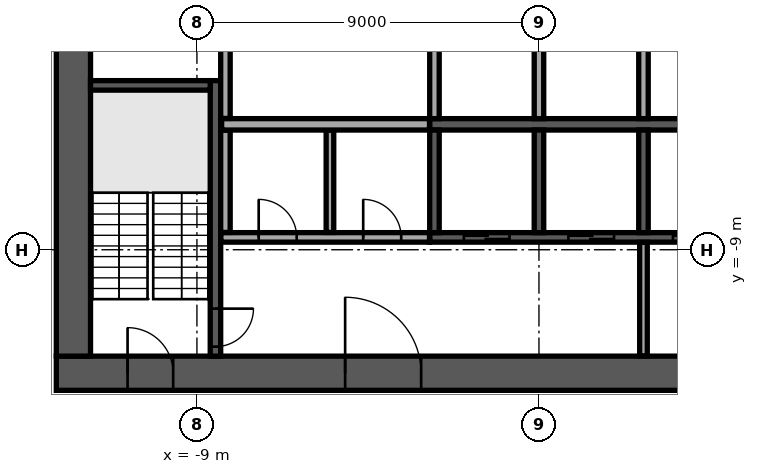
"""IFC4 building model, lengths in metres.
Left out: names, types, materials, properties, quantities, classifications, styles, units other than length and angle.
Written with IfcOpenShell. Run it as: python <this file> out.ifc"""

import sys

from ifc_helpers import new_model, si_unit, direction, frame, frame_2d, origin, place, context, subcontext, project, spatial, rectangle, extrude, element, fill, save


model = new_model("IFC4")
c1 = context("Model", 3, precision=1e-05, world=origin(), true_north=direction((0.0, 1.0)))
c2 = subcontext(c1, "Body", "Model", "MODEL_VIEW")
j1 = project(units=[si_unit("LENGTHUNIT", "METRE"), si_unit("PLANEANGLEUNIT", "RADIAN")], contexts=[c1])
p1 = place(None, origin())
s1 = spatial("IfcSite", under=j1, at=p1, CompositionType="ELEMENT")
p2 = place(p1, origin())
s2 = spatial("IfcBuilding", under=s1, at=p2, CompositionType="ELEMENT")
p3 = place(p2, frame((0.0, 0.0, 193.3)))
s3 = spatial("IfcBuildingStorey", under=s2, at=p3, CompositionType="ELEMENT", Elevation=193.3)
p4 = place(p3, frame((-12.7, -12.25, 0.0), z_axis=(0.0, 0.0, 1.0), x_axis=(1.0, 0.0, 0.0)))
e1 = element("IfcWall", 1, at=p4, inside=s3, PredefinedType="SHEAR", context=c2, shape_type="SweptSolid", body=[
    extrude(rectangle(XDim=25.4, YDim=0.9, at=frame_2d((12.7, 0.0))), origin(), (0.0, 0.0, 1.0), 3.62),
])
p5 = place(p4, frame((7.6, 0.0, 0.0)))
e2 = element("IfcOpeningElement", 2, at=p5, cuts=e1, PredefinedType="OPENING", context=c2, shape_type="SweptSolid", body=[
    extrude(rectangle(XDim=2.0, YDim=2.1, at=frame_2d((1.0, 1.05))), frame((0.0, 0.46, 0.0), z_axis=(0.0, -1.0, 0.0), x_axis=(1.0, 0.0, 0.0)), (0.0, 0.0, 1.0), 0.92),
])
p6 = place(p4, frame((17.725, 0.0, 0.0)))
e3 = element("IfcOpeningElement", 3, at=p6, cuts=e1, PredefinedType="OPENING", context=c2, shape_type="SweptSolid", body=[
    extrude(rectangle(XDim=1.2, YDim=2.1, at=frame_2d((0.6, 1.05))), frame((0.0, 0.46, 0.0), z_axis=(0.0, -1.0, 0.0), x_axis=(1.0, 0.0, 0.0)), (0.0, 0.0, 1.0), 0.92),
])
p7 = place(p4, frame((1.875, 0.0, 0.0)))
e4 = element("IfcOpeningElement", 4, at=p7, cuts=e1, PredefinedType="OPENING", context=c2, shape_type="SweptSolid", body=[
    extrude(rectangle(XDim=1.2, YDim=2.1, at=frame_2d((0.6, 1.05))), frame((0.0, 0.46, 0.0), z_axis=(0.0, -1.0, 0.0), x_axis=(1.0, 0.0, 0.0)), (0.0, 0.0, 1.0), 0.92),
])
p8 = place(p4, frame((22.325, 0.0, 0.0)))
e5 = element("IfcOpeningElement", 5, at=p8, cuts=e1, PredefinedType="OPENING", context=c2, shape_type="SweptSolid", body=[
    extrude(rectangle(XDim=1.2, YDim=2.1, at=frame_2d((0.6, 1.05))), frame((0.0, 0.46, 0.0), z_axis=(0.0, -1.0, 0.0), x_axis=(1.0, 0.0, 0.0)), (0.0, 0.0, 1.0), 0.92),
])
p9 = place(p3, frame((-12.25, -11.8, 0.0), z_axis=(0.0, 0.0, 1.0), x_axis=(0.0, 1.0, 0.0)))
e6 = element("IfcWall", 6, at=p9, inside=s3, PredefinedType="SHEAR", context=c2, shape_type="SweptSolid", body=[
    extrude(rectangle(XDim=23.6, YDim=0.9, at=frame_2d((11.8, 0.0))), origin(), (0.0, 0.0, 1.0), 3.62),
])
p10 = place(p9, frame((10.6, 0.0, 0.0)))
e7 = element("IfcOpeningElement", 7, at=p10, cuts=e6, PredefinedType="OPENING", context=c2, shape_type="SweptSolid", body=[
    extrude(rectangle(XDim=2.4, YDim=2.4, at=frame_2d((1.2, 1.2))), frame((0.0, 0.46, 0.0), z_axis=(0.0, -1.0, 0.0), x_axis=(1.0, 0.0, 0.0)), (0.0, 0.0, 1.0), 0.92),
])
p11 = place(p3, frame((-2.875, -5.7, 0.0), z_axis=(0.0, 0.0, 1.0), x_axis=(1.0, 0.0, 0.0)))
e8 = element("IfcWall", 8, at=p11, inside=s3, PredefinedType="SOLIDWALL", context=c2, shape_type="SweptSolid", body=[
    extrude(rectangle(XDim=11.25, YDim=0.3, at=frame_2d((5.625, 0.0))), origin(), (0.0, 0.0, 1.0), 3.62),
])
for number, where, z_axis, x_axis in (
    (9, (-2.75, -5.55, 0.0), (0.0, 0.0, 1.0), (0.0, 1.0, 0.0)),
    (10, (0.0, -5.55, 0.0), (0.0, 0.0, 1.0), (0.0, 1.0, 0.0)),
    (11, (2.75, -5.55, 0.0), (0.0, 0.0, 1.0), (0.0, 1.0, 0.0)),
):
    element("IfcWall", number, at=place(p3, frame(where, z_axis=z_axis, x_axis=x_axis)), inside=s3, PredefinedType="SOLIDWALL", context=c2, shape_type="SweptSolid", body=[
        extrude(rectangle(XDim=2.7, YDim=0.25, at=frame_2d((1.35, 0.0))), origin(), (0.0, 0.0, 1.0), 3.62),
    ])
p12 = place(p3, frame((-2.875, -8.675, 0.0), z_axis=(0.0, 0.0, 1.0), x_axis=(1.0, 0.0, 0.0)))
e12 = element("IfcWall", 12, at=p12, inside=s3, PredefinedType="SOLIDWALL", context=c2, shape_type="SweptSolid", body=[
    extrude(rectangle(XDim=11.25, YDim=0.25, at=frame_2d((5.625, 0.0))), origin(), (0.0, 0.0, 1.0), 3.62),
])
p13 = place(p12, frame((0.9, 0.0, 0.0)))
e13 = element("IfcOpeningElement", 13, at=p13, cuts=e12, PredefinedType="OPENING", context=c2, shape_type="SweptSolid", body=[
    extrude(rectangle(XDim=1.2, YDim=2.1, at=frame_2d((0.6, 1.05))), frame((0.0, 0.135, 0.0), z_axis=(0.0, -1.0, 0.0), x_axis=(1.0, 0.0, 0.0)), (0.0, 0.0, 1.0), 0.27),
])
p14 = place(p12, frame((3.65, 0.0, 0.0)))
e14 = element("IfcOpeningElement", 14, at=p14, cuts=e12, PredefinedType="OPENING", context=c2, shape_type="SweptSolid", body=[
    extrude(rectangle(XDim=1.2, YDim=2.1, at=frame_2d((0.6, 1.05))), frame((0.0, 0.135, 0.0), z_axis=(0.0, -1.0, 0.0), x_axis=(1.0, 0.0, 0.0)), (0.0, 0.0, 1.0), 0.27),
])
p15 = place(p12, frame((6.4, 0.0, 0.0)))
e15 = element("IfcOpeningElement", 15, at=p15, cuts=e12, PredefinedType="OPENING", context=c2, shape_type="SweptSolid", body=[
    extrude(rectangle(XDim=1.2, YDim=2.1, at=frame_2d((0.6, 1.05))), frame((0.0, 0.135, 0.0), z_axis=(0.0, -1.0, 0.0), x_axis=(1.0, 0.0, 0.0)), (0.0, 0.0, 1.0), 0.27),
])
p16 = place(p12, frame((9.15, 0.0, 0.0)))
e16 = element("IfcOpeningElement", 16, at=p16, cuts=e12, PredefinedType="OPENING", context=c2, shape_type="SweptSolid", body=[
    extrude(rectangle(XDim=1.2, YDim=2.1, at=frame_2d((0.6, 1.05))), frame((0.0, 0.135, 0.0), z_axis=(0.0, -1.0, 0.0), x_axis=(1.0, 0.0, 0.0)), (0.0, 0.0, 1.0), 0.27),
])
for number, where, z_axis, x_axis in (
    (17, (-2.75, -8.55, 0.0), (0.0, 0.0, 1.0), (0.0, 1.0, 0.0)),
    (18, (0.0, -8.55, 0.0), (0.0, 0.0, 1.0), (0.0, 1.0, 0.0)),
    (19, (2.75, -8.55, 0.0), (0.0, 0.0, 1.0), (0.0, 1.0, 0.0)),
):
    element("IfcWall", number, at=place(p3, frame(where, z_axis=z_axis, x_axis=x_axis)), inside=s3, PredefinedType="SOLIDWALL", context=c2, shape_type="SweptSolid", body=[
        extrude(rectangle(XDim=2.7, YDim=0.25, at=frame_2d((1.35, 0.0))), origin(), (0.0, 0.0, 1.0), 3.62),
    ])
p17 = place(p3, frame((-8.512, -4.55, 0.0), z_axis=(0.0, 0.0, 1.0), x_axis=(0.0, -1.0, 0.0)))
e20 = element("IfcWall", 20, at=p17, inside=s3, PredefinedType="SOLIDWALL", context=c2, shape_type="SweptSolid", body=[
    extrude(rectangle(XDim=7.25, YDim=0.275, at=frame_2d((3.625, 0.0))), origin(), (0.0, 0.0, 1.0), 3.62),
])
p18 = place(p17, frame((6.0, 0.0, 0.0)))
e21 = element("IfcOpeningElement", 21, at=p18, cuts=e20, PredefinedType="OPENING", context=c2, shape_type="SweptSolid", body=[
    extrude(rectangle(XDim=1.0, YDim=2.1, at=frame_2d((0.5, 1.05))), frame((0.0, 0.147, 0.0), z_axis=(0.0, -1.0, 0.0), x_axis=(1.0, 0.0, 0.0)), (0.0, 0.0, 1.0), 0.295),
])
p19 = place(p3, frame((-8.65, -4.675, 0.0), z_axis=(0.0, 0.0, 1.0), x_axis=(-1.0, 0.0, 0.0)))
e22 = element("IfcWall", 22, at=p19, inside=s3, PredefinedType="SOLIDWALL", context=c2, shape_type="SweptSolid", body=[
    extrude(rectangle(XDim=3.15, YDim=0.25, at=frame_2d((1.575, 0.0))), origin(), (0.0, 0.0, 1.0), 3.62),
])
p20 = place(p3, frame((2.75, -11.795, 0.0), z_axis=(0.0, 0.0, 1.0), x_axis=(0.0, 1.0, 0.0)))
e23 = element("IfcWall", 23, at=p20, inside=s3, PredefinedType="PARTITIONING", context=c2, shape_type="SweptSolid", body=[
    extrude(rectangle(XDim=2.99, YDim=0.2, at=frame_2d((1.495, 0.0))), origin(), (0.0, 0.0, 1.0), 3.62),
])
p21 = place(p3, frame((-8.37, -8.675, 0.0), z_axis=(0.0, 0.0, 1.0), x_axis=(1.0, 0.0, 0.0)))
e24 = element("IfcWall", 24, at=p21, inside=s3, PredefinedType="PARTITIONING", context=c2, shape_type="SweptSolid", body=[
    extrude(rectangle(XDim=5.49, YDim=0.25, at=frame_2d((2.745, 0.0))), origin(), (0.0, 0.0, 1.0), 3.62),
])
p22 = place(p21, frame((0.995, 0.0, 0.0)))
e25 = element("IfcOpeningElement", 25, at=p22, cuts=e24, PredefinedType="OPENING", context=c2, shape_type="SweptSolid", body=[
    extrude(rectangle(XDim=1.0, YDim=2.1, at=frame_2d((0.5, 1.05))), frame((0.0, 0.135, 0.0), z_axis=(0.0, -1.0, 0.0), x_axis=(1.0, 0.0, 0.0)), (0.0, 0.0, 1.0), 0.27),
])
p23 = place(p21, frame((3.745, 0.0, 0.0)))
e26 = element("IfcOpeningElement", 26, at=p23, cuts=e24, PredefinedType="OPENING", context=c2, shape_type="SweptSolid", body=[
    extrude(rectangle(XDim=1.0, YDim=2.1, at=frame_2d((0.5, 1.05))), frame((0.0, 0.135, 0.0), z_axis=(0.0, -1.0, 0.0), x_axis=(1.0, 0.0, 0.0)), (0.0, 0.0, 1.0), 0.27),
])
p24 = place(p3, frame((-8.25, -8.545, 0.0), z_axis=(0.0, 0.0, 1.0), x_axis=(0.0, 1.0, 0.0)))
e27 = element("IfcWall", 27, at=p24, inside=s3, PredefinedType="PARTITIONING", context=c2, shape_type="SweptSolid", body=[
    extrude(rectangle(XDim=2.69, YDim=0.25, at=frame_2d((1.345, 0.0))), origin(), (0.0, 0.0, 1.0), 3.62),
])
p25 = place(p3, frame((-5.5, -8.545, 0.0), z_axis=(0.0, 0.0, 1.0), x_axis=(0.0, 1.0, 0.0)))
e28 = element("IfcWall", 28, at=p25, inside=s3, PredefinedType="PARTITIONING", context=c2, shape_type="SweptSolid", body=[
    extrude(rectangle(XDim=2.69, YDim=0.2, at=frame_2d((1.345, 0.0))), origin(), (0.0, 0.0, 1.0), 3.62),
])
p26 = place(p3, frame((-8.35, -5.7, 0.0), z_axis=(0.0, 0.0, 1.0), x_axis=(1.0, 0.0, 0.0)))
e29 = element("IfcWall", 29, at=p26, inside=s3, PredefinedType="PARTITIONING", context=c2, shape_type="SweptSolid", body=[
    extrude(rectangle(XDim=5.47, YDim=0.3, at=frame_2d((2.735, 0.0))), origin(), (0.0, 0.0, 1.0), 3.62),
])
p27 = place(p3, frame((-8.25, -5.545, 0.0), z_axis=(0.0, 0.0, 1.0), x_axis=(0.0, 1.0, 0.0)))
e30 = element("IfcWall", 30, at=p27, inside=s3, PredefinedType="PARTITIONING", context=c2, shape_type="SweptSolid", body=[
    extrude(rectangle(XDim=2.69, YDim=0.25, at=frame_2d((1.345, 0.0))), origin(), (0.0, 0.0, 1.0), 3.62),
])
p28 = place(p3, frame((-35.208, -4.768, 0.0), z_axis=(0.0, 0.0, 1.0), x_axis=(0.656058749455, -0.754709823219, 0.0)))
e31 = element("IfcWall", 31, at=p28, inside=s3, PredefinedType="STANDARD", context=c2, shape_type="SweptSolid", body=[
    extrude(rectangle(XDim=39.0, YDim=0.6, at=frame_2d((19.5, 0.0))), origin(), (0.0, 0.0, 1.0), 3.62),
])
p29 = place(p28, frame((1.217, 0.0, 0.9)))
e32 = element("IfcOpeningElement", 32, at=p29, cuts=e31, PredefinedType="OPENING", context=c2, shape_type="SweptSolid", body=[
    extrude(rectangle(XDim=1.9, YDim=2.1, at=frame_2d((0.95, 1.05))), frame((0.0, 0.31, 0.0), z_axis=(0.0, -1.0, 0.0), x_axis=(1.0, 0.0, 0.0)), (0.0, 0.0, 1.0), 0.62),
])
p30 = place(p28, frame((5.55, 0.0, 0.9)))
e33 = element("IfcOpeningElement", 33, at=p30, cuts=e31, PredefinedType="OPENING", context=c2, shape_type="SweptSolid", body=[
    extrude(rectangle(XDim=1.9, YDim=2.1, at=frame_2d((0.95, 1.05))), frame((0.0, 0.31, 0.0), z_axis=(0.0, -1.0, 0.0), x_axis=(1.0, 0.0, 0.0)), (0.0, 0.0, 1.0), 0.62),
])
p31 = place(p28, frame((9.883, 0.0, 0.9)))
e34 = element("IfcOpeningElement", 34, at=p31, cuts=e31, PredefinedType="OPENING", context=c2, shape_type="SweptSolid", body=[
    extrude(rectangle(XDim=1.9, YDim=2.1, at=frame_2d((0.95, 1.05))), frame((0.0, 0.31, 0.0), z_axis=(0.0, -1.0, 0.0), x_axis=(1.0, 0.0, 0.0)), (0.0, 0.0, 1.0), 0.62),
])
p32 = place(p28, frame((14.217, 0.0, 0.9)))
e35 = element("IfcOpeningElement", 35, at=p32, cuts=e31, PredefinedType="OPENING", context=c2, shape_type="SweptSolid", body=[
    extrude(rectangle(XDim=1.9, YDim=2.1, at=frame_2d((0.95, 1.05))), frame((0.0, 0.31, 0.0), z_axis=(0.0, -1.0, 0.0), x_axis=(1.0, 0.0, 0.0)), (0.0, 0.0, 1.0), 0.62),
])
p33 = place(p28, frame((18.55, 0.0, 0.9)))
e36 = element("IfcOpeningElement", 36, at=p33, cuts=e31, PredefinedType="OPENING", context=c2, shape_type="SweptSolid", body=[
    extrude(rectangle(XDim=1.9, YDim=2.1, at=frame_2d((0.95, 1.05))), frame((0.0, 0.31, 0.0), z_axis=(0.0, -1.0, 0.0), x_axis=(1.0, 0.0, 0.0)), (0.0, 0.0, 1.0), 0.62),
])
p34 = place(p28, frame((22.883, 0.0, 0.9)))
e37 = element("IfcOpeningElement", 37, at=p34, cuts=e31, PredefinedType="OPENING", context=c2, shape_type="SweptSolid", body=[
    extrude(rectangle(XDim=1.9, YDim=2.1, at=frame_2d((0.95, 1.05))), frame((0.0, 0.31, 0.0), z_axis=(0.0, -1.0, 0.0), x_axis=(1.0, 0.0, 0.0)), (0.0, 0.0, 1.0), 0.62),
])
p35 = place(p28, frame((27.217, 0.0, 0.9)))
e38 = element("IfcOpeningElement", 38, at=p35, cuts=e31, PredefinedType="OPENING", context=c2, shape_type="SweptSolid", body=[
    extrude(rectangle(XDim=1.9, YDim=2.1, at=frame_2d((0.95, 1.05))), frame((0.0, 0.31, 0.0), z_axis=(0.0, -1.0, 0.0), x_axis=(1.0, 0.0, 0.0)), (0.0, 0.0, 1.0), 0.62),
])
p36 = place(p28, frame((31.55, 0.0, 0.9)))
e39 = element("IfcOpeningElement", 39, at=p36, cuts=e31, PredefinedType="OPENING", context=c2, shape_type="SweptSolid", body=[
    extrude(rectangle(XDim=1.9, YDim=2.1, at=frame_2d((0.95, 1.05))), frame((0.0, 0.31, 0.0), z_axis=(0.0, -1.0, 0.0), x_axis=(1.0, 0.0, 0.0)), (0.0, 0.0, 1.0), 0.62),
])
p37 = place(p28, frame((35.883, 0.0, 0.9)))
e40 = element("IfcOpeningElement", 40, at=p37, cuts=e31, PredefinedType="OPENING", context=c2, shape_type="SweptSolid", body=[
    extrude(rectangle(XDim=1.9, YDim=2.1, at=frame_2d((0.95, 1.05))), frame((0.0, 0.31, 0.0), z_axis=(0.0, -1.0, 0.0), x_axis=(1.0, 0.0, 0.0)), (0.0, 0.0, 1.0), 0.62),
])
p38 = place(p3, frame((-2.286, -34.715, 0.0), z_axis=(0.0, 0.0, 1.0), x_axis=(0.754708272811, 0.656060532993, 0.0)))
e41 = element("IfcWall", 41, at=p38, inside=s3, PredefinedType="STANDARD", context=c2, shape_type="SweptSolid", body=[
    extrude(rectangle(XDim=49.0, YDim=0.6, at=frame_2d((24.5, 0.0))), origin(), (0.0, 0.0, 1.0), 3.62),
])
p39 = place(p38, frame((1.227, 0.0, 0.9)))
e42 = element("IfcOpeningElement", 42, at=p39, cuts=e41, PredefinedType="OPENING", context=c2, shape_type="SweptSolid", body=[
    extrude(rectangle(XDim=2.0, YDim=2.1, at=frame_2d((1.0, 1.05))), frame((0.0, 0.31, 0.0), z_axis=(0.0, -1.0, 0.0), x_axis=(1.0, 0.0, 0.0)), (0.0, 0.0, 1.0), 0.62),
])
p40 = place(p38, frame((5.682, 0.0, 0.9)))
e43 = element("IfcOpeningElement", 43, at=p40, cuts=e41, PredefinedType="OPENING", context=c2, shape_type="SweptSolid", body=[
    extrude(rectangle(XDim=2.0, YDim=2.1, at=frame_2d((1.0, 1.05))), frame((0.0, 0.31, 0.0), z_axis=(0.0, -1.0, 0.0), x_axis=(1.0, 0.0, 0.0)), (0.0, 0.0, 1.0), 0.62),
])
p41 = place(p38, frame((10.136, 0.0, 0.9)))
e44 = element("IfcOpeningElement", 44, at=p41, cuts=e41, PredefinedType="OPENING", context=c2, shape_type="SweptSolid", body=[
    extrude(rectangle(XDim=2.0, YDim=2.1, at=frame_2d((1.0, 1.05))), frame((0.0, 0.31, 0.0), z_axis=(0.0, -1.0, 0.0), x_axis=(1.0, 0.0, 0.0)), (0.0, 0.0, 1.0), 0.62),
])
p42 = place(p38, frame((14.591, 0.0, 0.9)))
e45 = element("IfcOpeningElement", 45, at=p42, cuts=e41, PredefinedType="OPENING", context=c2, shape_type="SweptSolid", body=[
    extrude(rectangle(XDim=2.0, YDim=2.1, at=frame_2d((1.0, 1.05))), frame((0.0, 0.31, 0.0), z_axis=(0.0, -1.0, 0.0), x_axis=(1.0, 0.0, 0.0)), (0.0, 0.0, 1.0), 0.62),
])
p43 = place(p38, frame((19.045, 0.0, 0.9)))
e46 = element("IfcOpeningElement", 46, at=p43, cuts=e41, PredefinedType="OPENING", context=c2, shape_type="SweptSolid", body=[
    extrude(rectangle(XDim=2.0, YDim=2.1, at=frame_2d((1.0, 1.05))), frame((0.0, 0.31, 0.0), z_axis=(0.0, -1.0, 0.0), x_axis=(1.0, 0.0, 0.0)), (0.0, 0.0, 1.0), 0.62),
])
p44 = place(p38, frame((23.5, 0.0, 0.9)))
e47 = element("IfcOpeningElement", 47, at=p44, cuts=e41, PredefinedType="OPENING", context=c2, shape_type="SweptSolid", body=[
    extrude(rectangle(XDim=2.0, YDim=2.1, at=frame_2d((1.0, 1.05))), frame((0.0, 0.31, 0.0), z_axis=(0.0, -1.0, 0.0), x_axis=(1.0, 0.0, 0.0)), (0.0, 0.0, 1.0), 0.62),
])
p45 = place(p38, frame((27.955, 0.0, 0.9)))
e48 = element("IfcOpeningElement", 48, at=p45, cuts=e41, PredefinedType="OPENING", context=c2, shape_type="SweptSolid", body=[
    extrude(rectangle(XDim=2.0, YDim=2.1, at=frame_2d((1.0, 1.05))), frame((0.0, 0.31, 0.0), z_axis=(0.0, -1.0, 0.0), x_axis=(1.0, 0.0, 0.0)), (0.0, 0.0, 1.0), 0.62),
])
p46 = place(p38, frame((32.409, 0.0, 0.9)))
e49 = element("IfcOpeningElement", 49, at=p46, cuts=e41, PredefinedType="OPENING", context=c2, shape_type="SweptSolid", body=[
    extrude(rectangle(XDim=2.0, YDim=2.1, at=frame_2d((1.0, 1.05))), frame((0.0, 0.31, 0.0), z_axis=(0.0, -1.0, 0.0), x_axis=(1.0, 0.0, 0.0)), (0.0, 0.0, 1.0), 0.62),
])
p47 = place(p38, frame((36.864, 0.0, 0.9)))
e50 = element("IfcOpeningElement", 50, at=p47, cuts=e41, PredefinedType="OPENING", context=c2, shape_type="SweptSolid", body=[
    extrude(rectangle(XDim=2.0, YDim=2.1, at=frame_2d((1.0, 1.05))), frame((0.0, 0.31, 0.0), z_axis=(0.0, -1.0, 0.0), x_axis=(1.0, 0.0, 0.0)), (0.0, 0.0, 1.0), 0.62),
])
p48 = place(p38, frame((41.318, 0.0, 0.9)))
e51 = element("IfcOpeningElement", 51, at=p48, cuts=e41, PredefinedType="OPENING", context=c2, shape_type="SweptSolid", body=[
    extrude(rectangle(XDim=2.0, YDim=2.1, at=frame_2d((1.0, 1.05))), frame((0.0, 0.31, 0.0), z_axis=(0.0, -1.0, 0.0), x_axis=(1.0, 0.0, 0.0)), (0.0, 0.0, 1.0), 0.62),
])
p49 = place(p38, frame((45.773, 0.0, 0.9)))
e52 = element("IfcOpeningElement", 52, at=p49, cuts=e41, PredefinedType="OPENING", context=c2, shape_type="SweptSolid", body=[
    extrude(rectangle(XDim=2.0, YDim=2.1, at=frame_2d((1.0, 1.05))), frame((0.0, 0.31, 0.0), z_axis=(0.0, -1.0, 0.0), x_axis=(1.0, 0.0, 0.0)), (0.0, 0.0, 1.0), 0.62),
])
p50 = place(p3, frame((-24.98, -4.673, 0.0), z_axis=(0.0, 0.0, 1.0), x_axis=(0.656048444225, -0.754718781289, 0.0)))
e53 = element("IfcWall", 53, at=p50, inside=s3, PredefinedType="PARTITIONING", context=c2, shape_type="SweptSolid", body=[
    extrude(rectangle(XDim=25.8, YDim=0.15, at=frame_2d((12.9, 0.0))), origin(), (0.0, 0.0, 1.0), 3.17),
])
p51 = place(p50, frame((12.071, 0.0, 0.0)))
e54 = element("IfcOpeningElement", 54, at=p51, cuts=e53, PredefinedType="OPENING", context=c2, shape_type="SweptSolid", body=[
    extrude(rectangle(XDim=1.0, YDim=2.1, at=frame_2d((0.5, 1.05))), frame((0.0, 0.085, 0.0), z_axis=(0.0, -1.0, 0.0), x_axis=(1.0, 0.0, 0.0)), (0.0, 0.0, 1.0), 0.17),
])
p52 = place(p50, frame((24.318, 0.0, 0.0)))
e55 = element("IfcOpeningElement", 55, at=p52, cuts=e53, PredefinedType="OPENING", context=c2, shape_type="SweptSolid", body=[
    extrude(rectangle(XDim=1.0, YDim=2.1, at=frame_2d((0.5, 1.05))), frame((0.0, 0.085, 0.0), z_axis=(0.0, -1.0, 0.0), x_axis=(1.0, 0.0, 0.0)), (0.0, 0.0, 1.0), 0.17),
])
p53 = place(p3, frame((-1.0, -26.268, 0.0), z_axis=(0.0, 0.0, 1.0), x_axis=(0.754711356604, 0.656056985492, 0.0)))
e56 = element("IfcWall", 56, at=p53, inside=s3, PredefinedType="PARTITIONING", context=c2, shape_type="SweptSolid", body=[
    extrude(rectangle(XDim=36.052, YDim=0.15, at=frame_2d((18.026, 0.0))), origin(), (0.0, 0.0, 1.0), 3.17),
])
p54 = place(p53, frame((9.598, 0.0, 0.0)))
e57 = element("IfcOpeningElement", 57, at=p54, cuts=e56, PredefinedType="OPENING", context=c2, shape_type="SweptSolid", body=[
    extrude(rectangle(XDim=1.0, YDim=2.1, at=frame_2d((0.5, 1.05))), frame((0.0, 0.085, 0.0), z_axis=(0.0, -1.0, 0.0), x_axis=(1.0, 0.0, 0.0)), (0.0, 0.0, 1.0), 0.17),
])
p55 = place(p53, frame((20.957, 0.0, 0.0)))
e58 = element("IfcOpeningElement", 58, at=p55, cuts=e56, PredefinedType="OPENING", context=c2, shape_type="SweptSolid", body=[
    extrude(rectangle(XDim=1.0, YDim=2.1, at=frame_2d((0.5, 1.05))), frame((0.0, 0.085, 0.0), z_axis=(0.0, -1.0, 0.0), x_axis=(1.0, 0.0, 0.0)), (0.0, 0.0, 1.0), 0.17),
])
p56 = place(p53, frame((27.87, 0.0, 0.0)))
e59 = element("IfcOpeningElement", 59, at=p56, cuts=e56, PredefinedType="OPENING", context=c2, shape_type="SweptSolid", body=[
    extrude(rectangle(XDim=1.8, YDim=2.1, at=frame_2d((0.9, 1.05))), frame((0.0, 0.085, 0.0), z_axis=(0.0, -1.0, 0.0), x_axis=(1.0, 0.0, 0.0)), (0.0, 0.0, 1.0), 0.17),
])
p57 = place(p5, origin())
e60 = element("IfcDoor", 60, at=p57, inside=s3, OperationType="SINGLE_SWING_LEFT", PredefinedType="DOOR", context=c2, shape_type="SweptSolid", body=[
    extrude(rectangle(XDim=2.0, YDim=2.1, at=frame_2d((1.0, 1.05))), frame((0.0, 0.025, 0.0), z_axis=(0.0, -1.0, 0.0), x_axis=(1.0, 0.0, 0.0)), (0.0, 0.0, 1.0), 0.05),
])
fill(e2, e60)
p58 = place(p7, origin())
e61 = element("IfcDoor", 61, at=p58, inside=s3, OperationType="SINGLE_SWING_LEFT", PredefinedType="DOOR", context=c2, shape_type="SweptSolid", body=[
    extrude(rectangle(XDim=1.2, YDim=2.1, at=frame_2d((0.6, 1.05))), frame((0.0, 0.025, 0.0), z_axis=(0.0, -1.0, 0.0), x_axis=(1.0, 0.0, 0.0)), (0.0, 0.0, 1.0), 0.05),
])
fill(e4, e61)
p59 = place(p13, origin())
e62 = element("IfcDoor", 62, at=p59, inside=s3, OperationType="DOUBLE_DOOR_SLIDING", PredefinedType="DOOR", context=c2, shape_type="SweptSolid", body=[
    extrude(rectangle(XDim=1.2, YDim=2.1, at=frame_2d((0.6, 1.05))), frame((0.0, 0.025, 0.0), z_axis=(0.0, -1.0, 0.0), x_axis=(1.0, 0.0, 0.0)), (0.0, 0.0, 1.0), 0.05),
])
fill(e13, e62)
p60 = place(p14, origin())
e63 = element("IfcDoor", 63, at=p60, inside=s3, OperationType="DOUBLE_DOOR_SLIDING", PredefinedType="DOOR", context=c2, shape_type="SweptSolid", body=[
    extrude(rectangle(XDim=1.2, YDim=2.1, at=frame_2d((0.6, 1.05))), frame((0.0, 0.025, 0.0), z_axis=(0.0, -1.0, 0.0), x_axis=(1.0, 0.0, 0.0)), (0.0, 0.0, 1.0), 0.05),
])
fill(e14, e63)
p61 = place(p15, origin())
e64 = element("IfcDoor", 64, at=p61, inside=s3, OperationType="DOUBLE_DOOR_SLIDING", PredefinedType="DOOR", context=c2, shape_type="SweptSolid", body=[
    extrude(rectangle(XDim=1.2, YDim=2.1, at=frame_2d((0.6, 1.05))), frame((0.0, 0.025, 0.0), z_axis=(0.0, -1.0, 0.0), x_axis=(1.0, 0.0, 0.0)), (0.0, 0.0, 1.0), 0.05),
])
fill(e15, e64)
p62 = place(p18, origin())
e65 = element("IfcDoor", 65, at=p62, inside=s3, OperationType="SINGLE_SWING_LEFT", PredefinedType="DOOR", context=c2, shape_type="SweptSolid", body=[
    extrude(rectangle(XDim=1.0, YDim=2.1, at=frame_2d((0.5, 1.05))), frame((0.0, 0.025, 0.0), z_axis=(0.0, -1.0, 0.0), x_axis=(1.0, 0.0, 0.0)), (0.0, 0.0, 1.0), 0.05),
])
fill(e21, e65)
p63 = place(p22, origin())
e66 = element("IfcDoor", 66, at=p63, inside=s3, OperationType="SINGLE_SWING_RIGHT", PredefinedType="DOOR", context=c2, shape_type="SweptSolid", body=[
    extrude(rectangle(XDim=1.0, YDim=2.1, at=frame_2d((0.5, 1.05))), frame((0.0, 0.025, 0.0), z_axis=(0.0, -1.0, 0.0), x_axis=(1.0, 0.0, 0.0)), (0.0, 0.0, 1.0), 0.05),
])
fill(e25, e66)
p64 = place(p23, origin())
e67 = element("IfcDoor", 67, at=p64, inside=s3, OperationType="SINGLE_SWING_RIGHT", PredefinedType="DOOR", context=c2, shape_type="SweptSolid", body=[
    extrude(rectangle(XDim=1.0, YDim=2.1, at=frame_2d((0.5, 1.05))), frame((0.0, 0.025, 0.0), z_axis=(0.0, -1.0, 0.0), x_axis=(1.0, 0.0, 0.0)), (0.0, 0.0, 1.0), 0.05),
])
fill(e26, e67)
save(model, sys.argv[1])
